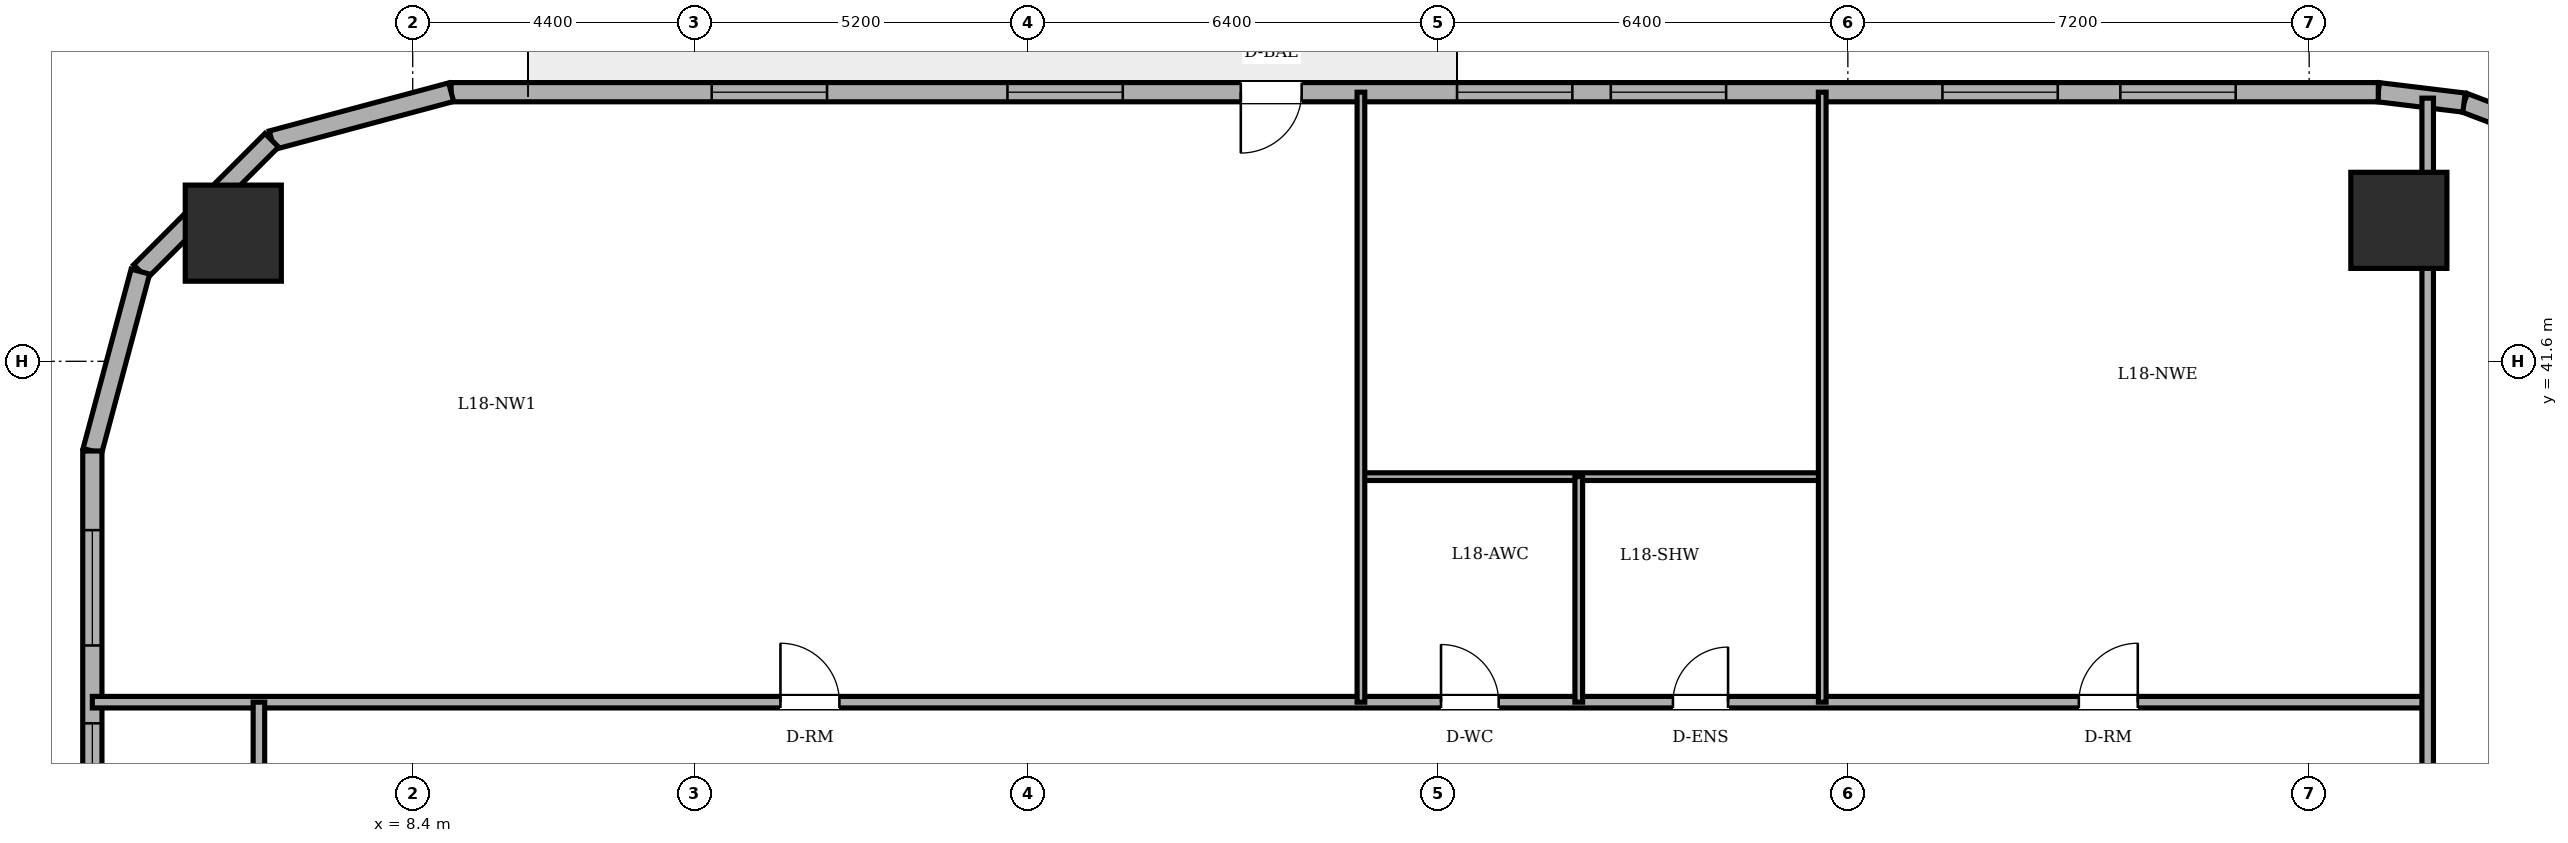
"""IFC4 building model, lengths in metres.
Left out: names, types, materials, properties, quantities, classifications, styles, units other than length and angle.
Written with IfcOpenShell. Run it as: python <this file> out.ifc"""

import sys

from ifc_helpers import new_model, si_unit, direction, frame, frame_2d, origin, origin_2d, place, context, subcontext, project, spatial, rectangle, circle, extrude, element, fill, save


model = new_model("IFC4")
c1 = context("Model", 3, precision=1e-05, world=origin(), true_north=direction((0.0, 1.0)))
c2 = subcontext(c1, "Body", "Model", "MODEL_VIEW")
j1 = project(units=[si_unit("LENGTHUNIT", "METRE"), si_unit("PLANEANGLEUNIT", "RADIAN")], contexts=[c1])
p1 = place(None, origin())
s1 = spatial("IfcSite", under=j1, at=p1, CompositionType="ELEMENT")
p2 = place(p1, origin())
s2 = spatial("IfcBuilding", under=s1, at=p2, CompositionType="ELEMENT")
p3 = place(p2, frame((0.0, 0.0, 68.4)))
s3 = spatial("IfcBuildingStorey", under=s2, at=p3, CompositionType="ELEMENT", Elevation=68.4)
for number, where, z_axis, x_axis in (
    (1, (39.4, 43.8, 0.0), (0.0, 0.0, 1.0), (1.0, 0.0, 0.0)),
    (2, (5.6, 43.6, 0.0), (0.0, 0.0, 1.0), (1.0, 0.0, 0.0)),
):
    element("IfcColumn", number, at=place(p3, frame(where, z_axis=z_axis, x_axis=x_axis)), inside=s3, PredefinedType="COLUMN", context=c2, shape_type="SweptSolid", body=[
        extrude(circle(Radius=0.75, at=origin_2d()), origin(), (0.0, 0.0, 1.0), 3.6),
    ])
p4 = place(p3, frame((41.679, 45.16, 0.0), z_axis=(0.0, 0.0, 1.0), x_axis=(-0.935156721165, 0.354234254216, 0.0)))
e3 = element("IfcWall", 3, at=p4, inside=s3, PredefinedType="SOLIDWALL", context=c2, shape_type="SweptSolid", body=[
    extrude(rectangle(XDim=1.349, YDim=0.3, at=frame_2d((0.675, 0.0))), origin(), (0.0, 0.0, 1.0), 3.4),
])
p5 = place(p3, frame((40.417, 45.638, 0.0), z_axis=(0.0, 0.0, 1.0), x_axis=(-0.992739027259, 0.120288086515, 0.0)))
e4 = element("IfcWall", 4, at=p5, inside=s3, PredefinedType="SOLIDWALL", context=c2, shape_type="SweptSolid", body=[
    extrude(rectangle(XDim=1.348, YDim=0.3, at=frame_2d((0.674, 0.0))), origin(), (0.0, 0.0, 1.0), 3.4),
])
p6 = place(p3, frame((39.079, 45.8, 0.0), z_axis=(0.0, 0.0, 1.0), x_axis=(-1.0, 0.0, 0.0)))
e5 = element("IfcWall", 5, at=p6, inside=s3, PredefinedType="SOLIDWALL", context=c2, shape_type="SweptSolid", body=[
    extrude(rectangle(XDim=30.079, YDim=0.3, at=frame_2d((15.04, 0.0))), origin(), (0.0, 0.0, 1.0), 3.4),
])
p7 = place(p6, frame((16.804, 0.0, 0.0)))
e6 = element("IfcOpeningElement", 6, at=p7, cuts=e5, PredefinedType="OPENING", context=c2, shape_type="SweptSolid", body=[
    extrude(rectangle(XDim=0.95, YDim=2.2, at=frame_2d((0.475, 1.1))), frame((0.0, 0.16, 0.0), z_axis=(0.0, -1.0, 0.0), x_axis=(1.0, 0.0, 0.0)), (0.0, 0.0, 1.0), 0.32),
])
p8 = place(p6, frame((2.226, 0.0, 0.85)))
e7 = element("IfcOpeningElement", 7, at=p8, cuts=e5, PredefinedType="OPENING", context=c2, shape_type="SweptSolid", body=[
    extrude(rectangle(XDim=1.8, YDim=1.55, at=frame_2d((0.9, 0.775))), frame((0.0, 0.16, 0.0), z_axis=(0.0, -1.0, 0.0), x_axis=(1.0, 0.0, 0.0)), (0.0, 0.0, 1.0), 0.32),
])
p9 = place(p6, frame((5.003, 0.0, 0.85)))
e8 = element("IfcOpeningElement", 8, at=p9, cuts=e5, PredefinedType="OPENING", context=c2, shape_type="SweptSolid", body=[
    extrude(rectangle(XDim=1.8, YDim=1.55, at=frame_2d((0.9, 0.775))), frame((0.0, 0.16, 0.0), z_axis=(0.0, -1.0, 0.0), x_axis=(1.0, 0.0, 0.0)), (0.0, 0.0, 1.0), 0.32),
])
p10 = place(p6, frame((10.179, 0.0, 0.85)))
e9 = element("IfcOpeningElement", 9, at=p10, cuts=e5, PredefinedType="OPENING", context=c2, shape_type="SweptSolid", body=[
    extrude(rectangle(XDim=1.8, YDim=1.55, at=frame_2d((0.9, 0.775))), frame((0.0, 0.16, 0.0), z_axis=(0.0, -1.0, 0.0), x_axis=(1.0, 0.0, 0.0)), (0.0, 0.0, 1.0), 0.32),
])
p11 = place(p6, frame((12.579, 0.0, 0.85)))
e10 = element("IfcOpeningElement", 10, at=p11, cuts=e5, PredefinedType="OPENING", context=c2, shape_type="SweptSolid", body=[
    extrude(rectangle(XDim=1.8, YDim=1.55, at=frame_2d((0.9, 0.775))), frame((0.0, 0.16, 0.0), z_axis=(0.0, -1.0, 0.0), x_axis=(1.0, 0.0, 0.0)), (0.0, 0.0, 1.0), 0.32),
])
p12 = place(p6, frame((19.596, 0.0, 0.85)))
e11 = element("IfcOpeningElement", 11, at=p12, cuts=e5, PredefinedType="OPENING", context=c2, shape_type="SweptSolid", body=[
    extrude(rectangle(XDim=1.8, YDim=1.55, at=frame_2d((0.9, 0.775))), frame((0.0, 0.16, 0.0), z_axis=(0.0, -1.0, 0.0), x_axis=(1.0, 0.0, 0.0)), (0.0, 0.0, 1.0), 0.32),
])
p13 = place(p6, frame((24.212, 0.0, 0.85)))
e12 = element("IfcOpeningElement", 12, at=p13, cuts=e5, PredefinedType="OPENING", context=c2, shape_type="SweptSolid", body=[
    extrude(rectangle(XDim=1.8, YDim=1.55, at=frame_2d((0.9, 0.775))), frame((0.0, 0.16, 0.0), z_axis=(0.0, -1.0, 0.0), x_axis=(1.0, 0.0, 0.0)), (0.0, 0.0, 1.0), 0.32),
])
p14 = place(p3, frame((9.0, 45.8, 0.0), z_axis=(0.0, 0.0, 1.0), x_axis=(-0.96594917914, -0.258731875344, 0.0)))
e13 = element("IfcWall", 13, at=p14, inside=s3, PredefinedType="SOLIDWALL", context=c2, shape_type="SweptSolid", body=[
    extrude(rectangle(XDim=2.899, YDim=0.3, at=frame_2d((1.449, 0.0))), origin(), (0.0, 0.0, 1.0), 3.4),
])
p15 = place(p3, frame((6.2, 45.05, 0.0), z_axis=(0.0, 0.0, 1.0), x_axis=(-0.707106781187, -0.707106781187, 0.0)))
e14 = element("IfcWall", 14, at=p15, inside=s3, PredefinedType="SOLIDWALL", context=c2, shape_type="SweptSolid", body=[
    extrude(rectangle(XDim=2.899, YDim=0.3, at=frame_2d((1.45, 0.0))), origin(), (0.0, 0.0, 1.0), 3.4),
])
p16 = place(p3, frame((4.15, 43.0, 0.0), z_axis=(0.0, 0.0, 1.0), x_axis=(-0.258731875344, -0.96594917914, 0.0)))
e15 = element("IfcWall", 15, at=p16, inside=s3, PredefinedType="SOLIDWALL", context=c2, shape_type="SweptSolid", body=[
    extrude(rectangle(XDim=2.899, YDim=0.3, at=frame_2d((1.449, 0.0))), origin(), (0.0, 0.0, 1.0), 3.4),
])
p17 = place(p3, frame((3.4, 40.2, 0.0), z_axis=(0.0, 0.0, 1.0), x_axis=(0.0, -1.0, 0.0)))
e16 = element("IfcWall", 16, at=p17, inside=s3, PredefinedType="SOLIDWALL", context=c2, shape_type="SweptSolid", body=[
    extrude(rectangle(XDim=32.4, YDim=0.3, at=frame_2d((16.2, 0.0))), origin(), (0.0, 0.0, 1.0), 3.4),
])
p18 = place(p17, frame((1.235, 0.0, 0.85)))
e17 = element("IfcOpeningElement", 17, at=p18, cuts=e16, PredefinedType="OPENING", context=c2, shape_type="SweptSolid", body=[
    extrude(rectangle(XDim=1.8, YDim=1.55, at=frame_2d((0.9, 0.775))), frame((0.0, 0.16, 0.0), z_axis=(0.0, -1.0, 0.0), x_axis=(1.0, 0.0, 0.0)), (0.0, 0.0, 1.0), 0.32),
])
p19 = place(p17, frame((4.25, 0.0, 0.85)))
e18 = element("IfcOpeningElement", 18, at=p19, cuts=e16, PredefinedType="OPENING", context=c2, shape_type="SweptSolid", body=[
    extrude(rectangle(XDim=1.8, YDim=1.55, at=frame_2d((0.9, 0.775))), frame((0.0, 0.16, 0.0), z_axis=(0.0, -1.0, 0.0), x_axis=(1.0, 0.0, 0.0)), (0.0, 0.0, 1.0), 0.32),
])
p20 = place(p17, frame((9.253, 0.0, 0.85)))
e19 = element("IfcOpeningElement", 19, at=p20, cuts=e16, PredefinedType="OPENING", context=c2, shape_type="SweptSolid", body=[
    extrude(rectangle(XDim=1.8, YDim=1.55, at=frame_2d((0.9, 0.775))), frame((0.0, 0.16, 0.0), z_axis=(0.0, -1.0, 0.0), x_axis=(1.0, 0.0, 0.0)), (0.0, 0.0, 1.0), 0.32),
])
p21 = place(p17, frame((13.027, 0.0, 0.85)))
e20 = element("IfcOpeningElement", 20, at=p21, cuts=e16, PredefinedType="OPENING", context=c2, shape_type="SweptSolid", body=[
    extrude(rectangle(XDim=1.8, YDim=1.55, at=frame_2d((0.9, 0.775))), frame((0.0, 0.16, 0.0), z_axis=(0.0, -1.0, 0.0), x_axis=(1.0, 0.0, 0.0)), (0.0, 0.0, 1.0), 0.32),
])
p22 = place(p17, frame((19.573, 0.0, 0.85)))
e21 = element("IfcOpeningElement", 21, at=p22, cuts=e16, PredefinedType="OPENING", context=c2, shape_type="SweptSolid", body=[
    extrude(rectangle(XDim=1.8, YDim=1.55, at=frame_2d((0.9, 0.775))), frame((0.0, 0.16, 0.0), z_axis=(0.0, -1.0, 0.0), x_axis=(1.0, 0.0, 0.0)), (0.0, 0.0, 1.0), 0.32),
])
p23 = place(p17, frame((22.347, 0.0, 0.85)))
e22 = element("IfcOpeningElement", 22, at=p23, cuts=e16, PredefinedType="OPENING", context=c2, shape_type="SweptSolid", body=[
    extrude(rectangle(XDim=1.8, YDim=1.55, at=frame_2d((0.9, 0.775))), frame((0.0, 0.16, 0.0), z_axis=(0.0, -1.0, 0.0), x_axis=(1.0, 0.0, 0.0)), (0.0, 0.0, 1.0), 0.32),
])
p24 = place(p17, frame((26.35, 0.0, 0.85)))
e23 = element("IfcOpeningElement", 23, at=p24, cuts=e16, PredefinedType="OPENING", context=c2, shape_type="SweptSolid", body=[
    extrude(rectangle(XDim=1.8, YDim=1.55, at=frame_2d((0.9, 0.775))), frame((0.0, 0.16, 0.0), z_axis=(0.0, -1.0, 0.0), x_axis=(1.0, 0.0, 0.0)), (0.0, 0.0, 1.0), 0.32),
])
p25 = place(p17, frame((29.365, 0.0, 0.85)))
e24 = element("IfcOpeningElement", 24, at=p25, cuts=e16, PredefinedType="OPENING", context=c2, shape_type="SweptSolid", body=[
    extrude(rectangle(XDim=1.8, YDim=1.55, at=frame_2d((0.9, 0.775))), frame((0.0, 0.16, 0.0), z_axis=(0.0, -1.0, 0.0), x_axis=(1.0, 0.0, 0.0)), (0.0, 0.0, 1.0), 0.32),
])
p26 = place(p3, frame((3.4, 36.28, 0.0), z_axis=(0.0, 0.0, 1.0), x_axis=(1.0, 0.0, 0.0)))
e25 = element("IfcWall", 25, at=p26, inside=s3, PredefinedType="PARTITIONING", context=c2, shape_type="SweptSolid", body=[
    extrude(rectangle(XDim=36.45, YDim=0.18, at=frame_2d((18.225, 0.0))), origin(), (0.0, 0.0, 1.0), 3.4),
])
p27 = place(p26, frame((21.05, 0.0, 0.0)))
e26 = element("IfcOpeningElement", 26, at=p27, cuts=e25, PredefinedType="OPENING", context=c2, shape_type="SweptSolid", body=[
    extrude(rectangle(XDim=0.9, YDim=2.1, at=frame_2d((0.45, 1.05))), frame((0.0, 0.1, 0.0), z_axis=(0.0, -1.0, 0.0), x_axis=(1.0, 0.0, 0.0)), (0.0, 0.0, 1.0), 0.2),
])
p28 = place(p26, frame((24.67, 0.0, 0.0)))
e27 = element("IfcOpeningElement", 27, at=p28, cuts=e25, PredefinedType="OPENING", context=c2, shape_type="SweptSolid", body=[
    extrude(rectangle(XDim=0.86, YDim=2.1, at=frame_2d((0.43, 1.05))), frame((0.0, 0.1, 0.0), z_axis=(0.0, -1.0, 0.0), x_axis=(1.0, 0.0, 0.0)), (0.0, 0.0, 1.0), 0.2),
])
p29 = place(p26, frame((10.74, 0.0, 0.0)))
e28 = element("IfcOpeningElement", 28, at=p29, cuts=e25, PredefinedType="OPENING", context=c2, shape_type="SweptSolid", body=[
    extrude(rectangle(XDim=0.92, YDim=2.1, at=frame_2d((0.46, 1.05))), frame((0.0, 0.1, 0.0), z_axis=(0.0, -1.0, 0.0), x_axis=(1.0, 0.0, 0.0)), (0.0, 0.0, 1.0), 0.2),
])
p30 = place(p26, frame((31.005, 0.0, 0.0)))
e29 = element("IfcOpeningElement", 29, at=p30, cuts=e25, PredefinedType="OPENING", context=c2, shape_type="SweptSolid", body=[
    extrude(rectangle(XDim=0.92, YDim=2.1, at=frame_2d((0.46, 1.05))), frame((0.0, 0.1, 0.0), z_axis=(0.0, -1.0, 0.0), x_axis=(1.0, 0.0, 0.0)), (0.0, 0.0, 1.0), 0.2),
])
p31 = place(p3, frame((23.2, 39.8, 0.0), z_axis=(0.0, 0.0, 1.0), x_axis=(1.0, 0.0, 0.0)))
e30 = element("IfcWall", 30, at=p31, inside=s3, PredefinedType="PARTITIONING", context=c2, shape_type="SweptSolid", body=[
    extrude(rectangle(XDim=7.2, YDim=0.12, at=frame_2d((3.6, 0.0))), origin(), (0.0, 0.0, 1.0), 3.4),
])
p32 = place(p3, frame((6.0, 33.82, 0.0), z_axis=(0.0, 0.0, 1.0), x_axis=(0.0, 1.0, 0.0)))
e31 = element("IfcWall", 31, at=p32, inside=s3, PredefinedType="PARTITIONING", context=c2, shape_type="SweptSolid", body=[
    extrude(rectangle(XDim=2.46, YDim=0.18, at=frame_2d((1.23, 0.0))), origin(), (0.0, 0.0, 1.0), 3.4),
])
p33 = place(p3, frame((23.2, 36.28, 0.0), z_axis=(0.0, 0.0, 1.0), x_axis=(0.0, 1.0, 0.0)))
e32 = element("IfcWall", 32, at=p33, inside=s3, PredefinedType="PARTITIONING", context=c2, shape_type="SweptSolid", body=[
    extrude(rectangle(XDim=9.52, YDim=0.12, at=frame_2d((4.76, 0.0))), origin(), (0.0, 0.0, 1.0), 3.4),
])
p34 = place(p3, frame((26.6, 36.28, 0.0), z_axis=(0.0, 0.0, 1.0), x_axis=(0.0, 1.0, 0.0)))
e33 = element("IfcWall", 33, at=p34, inside=s3, PredefinedType="PARTITIONING", context=c2, shape_type="SweptSolid", body=[
    extrude(rectangle(XDim=3.52, YDim=0.12, at=frame_2d((1.76, 0.0))), origin(), (0.0, 0.0, 1.0), 3.4),
])
p35 = place(p3, frame((30.4, 36.28, 0.0), z_axis=(0.0, 0.0, 1.0), x_axis=(0.0, 1.0, 0.0)))
e34 = element("IfcWall", 34, at=p35, inside=s3, PredefinedType="PARTITIONING", context=c2, shape_type="SweptSolid", body=[
    extrude(rectangle(XDim=9.52, YDim=0.12, at=frame_2d((4.76, 0.0))), origin(), (0.0, 0.0, 1.0), 3.4),
])
p36 = place(p3, frame((39.85, 14.18, 0.0), z_axis=(0.0, 0.0, 1.0), x_axis=(0.0, 1.0, 0.0)))
e35 = element("IfcWall", 35, at=p36, inside=s3, PredefinedType="PARTITIONING", context=c2, shape_type="SweptSolid", body=[
    extrude(rectangle(XDim=31.527, YDim=0.18, at=frame_2d((15.764, 0.0))), origin(), (0.0, 0.0, 1.0), 2.782),
])
p37 = place(p36, frame((13.87, 0.0, 0.0)))
e36 = element("IfcOpeningElement", 36, at=p37, cuts=e35, PredefinedType="OPENING", context=c2, shape_type="SweptSolid", body=[
    extrude(rectangle(XDim=0.92, YDim=2.1, at=frame_2d((0.46, 1.05))), frame((0.0, 0.1, 0.0), z_axis=(0.0, -1.0, 0.0), x_axis=(1.0, 0.0, 0.0)), (0.0, 0.0, 1.0), 0.2),
])
p38 = place(p7, origin())
e37 = element("IfcDoor", 37, at=p38, inside=s3, OperationType="SINGLE_SWING_RIGHT", PredefinedType="DOOR", context=c2, shape_type="SweptSolid", body=[
    extrude(rectangle(XDim=0.95, YDim=2.2, at=frame_2d((0.475, 1.1))), frame((0.0, 0.025, 0.0), z_axis=(0.0, -1.0, 0.0), x_axis=(1.0, 0.0, 0.0)), (0.0, 0.0, 1.0), 0.05),
])
fill(e6, e37)
p39 = place(p8, origin())
e38 = element("IfcWindow", 38, at=p39, inside=s3, PartitioningType="DOUBLE_PANEL_VERTICAL", PredefinedType="WINDOW", context=c2, shape_type="SweptSolid", body=[
    extrude(rectangle(XDim=1.8, YDim=1.55, at=frame_2d((0.9, 0.775))), frame((0.0, 0.03, 0.0), z_axis=(0.0, -1.0, 0.0), x_axis=(1.0, 0.0, 0.0)), (0.0, 0.0, 1.0), 0.06),
])
fill(e7, e38)
p40 = place(p9, origin())
e39 = element("IfcWindow", 39, at=p40, inside=s3, PartitioningType="DOUBLE_PANEL_VERTICAL", PredefinedType="WINDOW", context=c2, shape_type="SweptSolid", body=[
    extrude(rectangle(XDim=1.8, YDim=1.55, at=frame_2d((0.9, 0.775))), frame((0.0, 0.03, 0.0), z_axis=(0.0, -1.0, 0.0), x_axis=(1.0, 0.0, 0.0)), (0.0, 0.0, 1.0), 0.06),
])
fill(e8, e39)
p41 = place(p10, origin())
e40 = element("IfcWindow", 40, at=p41, inside=s3, PartitioningType="DOUBLE_PANEL_VERTICAL", PredefinedType="WINDOW", context=c2, shape_type="SweptSolid", body=[
    extrude(rectangle(XDim=1.8, YDim=1.55, at=frame_2d((0.9, 0.775))), frame((0.0, 0.03, 0.0), z_axis=(0.0, -1.0, 0.0), x_axis=(1.0, 0.0, 0.0)), (0.0, 0.0, 1.0), 0.06),
])
fill(e9, e40)
p42 = place(p11, origin())
e41 = element("IfcWindow", 41, at=p42, inside=s3, PartitioningType="DOUBLE_PANEL_VERTICAL", PredefinedType="WINDOW", context=c2, shape_type="SweptSolid", body=[
    extrude(rectangle(XDim=1.8, YDim=1.55, at=frame_2d((0.9, 0.775))), frame((0.0, 0.03, 0.0), z_axis=(0.0, -1.0, 0.0), x_axis=(1.0, 0.0, 0.0)), (0.0, 0.0, 1.0), 0.06),
])
fill(e10, e41)
p43 = place(p12, origin())
e42 = element("IfcWindow", 42, at=p43, inside=s3, PartitioningType="DOUBLE_PANEL_VERTICAL", PredefinedType="WINDOW", context=c2, shape_type="SweptSolid", body=[
    extrude(rectangle(XDim=1.8, YDim=1.55, at=frame_2d((0.9, 0.775))), frame((0.0, 0.03, 0.0), z_axis=(0.0, -1.0, 0.0), x_axis=(1.0, 0.0, 0.0)), (0.0, 0.0, 1.0), 0.06),
])
fill(e11, e42)
p44 = place(p13, origin())
e43 = element("IfcWindow", 43, at=p44, inside=s3, PartitioningType="DOUBLE_PANEL_VERTICAL", PredefinedType="WINDOW", context=c2, shape_type="SweptSolid", body=[
    extrude(rectangle(XDim=1.8, YDim=1.55, at=frame_2d((0.9, 0.775))), frame((0.0, 0.03, 0.0), z_axis=(0.0, -1.0, 0.0), x_axis=(1.0, 0.0, 0.0)), (0.0, 0.0, 1.0), 0.06),
])
fill(e12, e43)
p45 = place(p18, origin())
e44 = element("IfcWindow", 44, at=p45, inside=s3, PartitioningType="DOUBLE_PANEL_VERTICAL", PredefinedType="WINDOW", context=c2, shape_type="SweptSolid", body=[
    extrude(rectangle(XDim=1.8, YDim=1.55, at=frame_2d((0.9, 0.775))), frame((0.0, 0.03, 0.0), z_axis=(0.0, -1.0, 0.0), x_axis=(1.0, 0.0, 0.0)), (0.0, 0.0, 1.0), 0.06),
])
fill(e17, e44)
p46 = place(p19, origin())
e45 = element("IfcWindow", 45, at=p46, inside=s3, PartitioningType="DOUBLE_PANEL_VERTICAL", PredefinedType="WINDOW", context=c2, shape_type="SweptSolid", body=[
    extrude(rectangle(XDim=1.8, YDim=1.55, at=frame_2d((0.9, 0.775))), frame((0.0, 0.03, 0.0), z_axis=(0.0, -1.0, 0.0), x_axis=(1.0, 0.0, 0.0)), (0.0, 0.0, 1.0), 0.06),
])
fill(e18, e45)
p47 = place(p27, origin())
e46 = element("IfcDoor", 46, at=p47, inside=s3, OperationType="SINGLE_SWING_LEFT", PredefinedType="DOOR", context=c2, shape_type="SweptSolid", body=[
    extrude(rectangle(XDim=0.9, YDim=2.1, at=frame_2d((0.45, 1.05))), frame((0.0, 0.025, 0.0), z_axis=(0.0, -1.0, 0.0), x_axis=(1.0, 0.0, 0.0)), (0.0, 0.0, 1.0), 0.05),
])
fill(e26, e46)
p48 = place(p28, origin())
e47 = element("IfcDoor", 47, at=p48, inside=s3, OperationType="SINGLE_SWING_RIGHT", PredefinedType="DOOR", context=c2, shape_type="SweptSolid", body=[
    extrude(rectangle(XDim=0.86, YDim=2.1, at=frame_2d((0.43, 1.05))), frame((0.0, 0.025, 0.0), z_axis=(0.0, -1.0, 0.0), x_axis=(1.0, 0.0, 0.0)), (0.0, 0.0, 1.0), 0.05),
])
fill(e27, e47)
p49 = place(p29, origin())
e48 = element("IfcDoor", 48, at=p49, inside=s3, OperationType="SINGLE_SWING_LEFT", PredefinedType="DOOR", context=c2, shape_type="SweptSolid", body=[
    extrude(rectangle(XDim=0.92, YDim=2.1, at=frame_2d((0.46, 1.05))), frame((0.0, 0.025, 0.0), z_axis=(0.0, -1.0, 0.0), x_axis=(1.0, 0.0, 0.0)), (0.0, 0.0, 1.0), 0.05),
])
fill(e28, e48)
p50 = place(p30, origin())
e49 = element("IfcDoor", 49, at=p50, inside=s3, OperationType="SINGLE_SWING_RIGHT", PredefinedType="DOOR", context=c2, shape_type="SweptSolid", body=[
    extrude(rectangle(XDim=0.92, YDim=2.1, at=frame_2d((0.46, 1.05))), frame((0.0, 0.025, 0.0), z_axis=(0.0, -1.0, 0.0), x_axis=(1.0, 0.0, 0.0)), (0.0, 0.0, 1.0), 0.05),
])
fill(e29, e49)
save(model, sys.argv[1])
